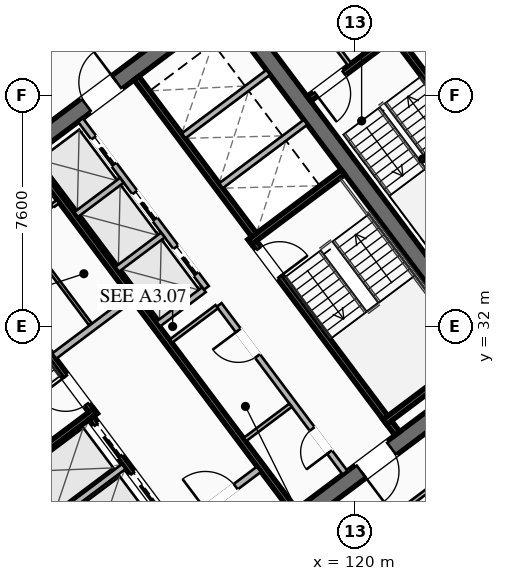
"""IFC4 building model, lengths in metres.
Left out: names, types, materials, properties, quantities, classifications, styles, units other than length and angle.
Written with IfcOpenShell. Run it as: python <this file> out.ifc"""

import sys

from ifc_helpers import new_model, si_unit, direction, frame, frame_2d, origin, place, context, subcontext, project, spatial, rectangle, extrude, element, fill, save


model = new_model("IFC4")
c1 = context("Model", 3, precision=1e-05, world=origin(), true_north=direction((0.0, 1.0)))
c2 = subcontext(c1, "Body", "Model", "MODEL_VIEW")
j1 = project(units=[si_unit("LENGTHUNIT", "METRE"), si_unit("PLANEANGLEUNIT", "RADIAN")], contexts=[c1])
p1 = place(None, origin())
s1 = spatial("IfcSite", under=j1, at=p1, CompositionType="ELEMENT")
p2 = place(p1, origin())
s2 = spatial("IfcBuilding", under=s1, at=p2, CompositionType="ELEMENT")
p3 = place(p2, frame((0.0, 0.0, 153.45)))
s3 = spatial("IfcBuildingStorey", under=s2, at=p3, CompositionType="ELEMENT", Elevation=153.45)
for number, where, z_axis, x_axis in (
    (1, (112.436, 21.077, 0.0), (0.0, 0.0, 1.0), (-0.6, 0.8, 0.0)),
    (2, (115.564, 42.923, 0.0), (0.0, 0.0, 1.0), (0.6, -0.8, 0.0)),
):
    element("IfcWall", number, at=place(p3, frame(where, z_axis=z_axis, x_axis=x_axis)), inside=s3, PredefinedType="SHEAR", context=c2, shape_type="SweptSolid", body=[
        extrude(rectangle(XDim=15.6, YDim=0.55, at=frame_2d((7.8, 0.0))), origin(), (0.0, 0.0, 1.0), 3.55),
    ])
p4 = place(p3, frame((124.539, 30.498, 0.0), z_axis=(0.0, 0.0, 1.0), x_axis=(-0.799998054672, -0.600002593761, 0.0)))
e3 = element("IfcWall", 3, at=p4, inside=s3, PredefinedType="SHEAR", context=c2, shape_type="SweptSolid", body=[
    extrude(rectangle(XDim=15.06, YDim=0.55, at=frame_2d((7.53, 0.0))), origin(), (0.0, 0.0, 1.0), 3.55),
])
p5 = place(p4, frame((9.23, 0.0, 0.0)))
e4 = element("IfcOpeningElement", 4, at=p5, cuts=e3, PredefinedType="OPENING", context=c2, shape_type="SweptSolid", body=[
    extrude(rectangle(XDim=1.25, YDim=2.25, at=frame_2d((0.625, 1.125))), frame((0.0, 0.285, 0.0), z_axis=(0.0, -1.0, 0.0), x_axis=(1.0, 0.0, 0.0)), (0.0, 0.0, 1.0), 0.57),
])
p6 = place(p4, frame((4.18, 0.0, 0.0)))
e5 = element("IfcOpeningElement", 5, at=p6, cuts=e3, PredefinedType="OPENING", context=c2, shape_type="SweptSolid", body=[
    extrude(rectangle(XDim=1.25, YDim=2.25, at=frame_2d((0.625, 1.125))), frame((0.0, 0.285, 0.0), z_axis=(0.0, -1.0, 0.0), x_axis=(1.0, 0.0, 0.0)), (0.0, 0.0, 1.0), 0.57),
])
p7 = place(p3, frame((103.461, 33.502, 0.0), z_axis=(0.0, 0.0, 1.0), x_axis=(0.799998054672, 0.600002593761, 0.0)))
e6 = element("IfcWall", 6, at=p7, inside=s3, PredefinedType="SHEAR", context=c2, shape_type="SweptSolid", body=[
    extrude(rectangle(XDim=15.06, YDim=0.55, at=frame_2d((7.53, 0.0))), origin(), (0.0, 0.0, 1.0), 3.55),
])
p8 = place(p7, frame((4.58, 0.0, 0.0)))
e7 = element("IfcOpeningElement", 7, at=p8, cuts=e6, PredefinedType="OPENING", context=c2, shape_type="SweptSolid", body=[
    extrude(rectangle(XDim=1.25, YDim=2.25, at=frame_2d((0.625, 1.125))), frame((0.0, 0.285, 0.0), z_axis=(0.0, -1.0, 0.0), x_axis=(1.0, 0.0, 0.0)), (0.0, 0.0, 1.0), 0.57),
])
p9 = place(p7, frame((9.63, 0.0, 0.0)))
e8 = element("IfcOpeningElement", 8, at=p9, cuts=e6, PredefinedType="OPENING", context=c2, shape_type="SweptSolid", body=[
    extrude(rectangle(XDim=1.25, YDim=2.25, at=frame_2d((0.625, 1.125))), frame((0.0, 0.285, 0.0), z_axis=(0.0, -1.0, 0.0), x_axis=(1.0, 0.0, 0.0)), (0.0, 0.0, 1.0), 0.57),
])
p10 = place(p3, frame((111.44, 29.08, 0.0), z_axis=(0.0, 0.0, 1.0), x_axis=(-0.59999029481, 0.8000072788, 0.0)))
e9 = element("IfcWall", 9, at=p10, inside=s3, PredefinedType="SHEAR", context=c2, shape_type="SweptSolid", body=[
    extrude(rectangle(XDim=8.05, YDim=0.2, at=frame_2d((4.025, 0.0))), origin(), (0.0, 0.0, 1.0), 3.37),
])
p11 = place(p10, frame((0.45, 0.0, 0.0)))
e10 = element("IfcOpeningElement", 10, at=p11, cuts=e9, PredefinedType="OPENING", context=c2, shape_type="SweptSolid", body=[
    extrude(rectangle(XDim=1.15, YDim=2.2, at=frame_2d((0.575, 1.1))), frame((0.0, 0.11, 0.0), z_axis=(0.0, -1.0, 0.0), x_axis=(1.0, 0.0, 0.0)), (0.0, 0.0, 1.0), 0.22),
])
p12 = place(p3, frame((108.396, 26.922, 0.0), z_axis=(0.0, 0.0, 1.0), x_axis=(0.800015298837, 0.599979601008, 0.0)))
e11 = element("IfcWall", 11, at=p12, inside=s3, PredefinedType="SHEAR", context=c2, shape_type="SweptSolid", body=[
    extrude(rectangle(XDim=3.83, YDim=0.2, at=frame_2d((1.915, 0.0))), origin(), (0.0, 0.0, 1.0), 3.37),
])
p13 = place(p3, frame((116.56, 34.92, 0.0), z_axis=(0.0, 0.0, 1.0), x_axis=(0.59999029481, -0.8000072788, 0.0)))
e12 = element("IfcWall", 12, at=p13, inside=s3, PredefinedType="SHEAR", context=c2, shape_type="SweptSolid", body=[
    extrude(rectangle(XDim=8.05, YDim=0.2, at=frame_2d((4.025, 0.0))), origin(), (0.0, 0.0, 1.0), 3.37),
])
p14 = place(p13, frame((0.45, 0.0, 0.0)))
e13 = element("IfcOpeningElement", 13, at=p14, cuts=e12, PredefinedType="OPENING", context=c2, shape_type="SweptSolid", body=[
    extrude(rectangle(XDim=1.15, YDim=2.2, at=frame_2d((0.575, 1.1))), frame((0.0, 0.11, 0.0), z_axis=(0.0, -1.0, 0.0), x_axis=(1.0, 0.0, 0.0)), (0.0, 0.0, 1.0), 0.22),
])
for number, where, z_axis, x_axis in (
    (14, (116.54, 34.78, 0.0), (0.0, 0.0, 1.0), (0.8, 0.6, 0.0)),
    (15, (120.98, 28.86, 0.0), (0.0, 0.0, 1.0), (0.8, 0.6, 0.0)),
):
    element("IfcWall", number, at=place(p3, frame(where, z_axis=z_axis, x_axis=x_axis)), inside=s3, PredefinedType="SHEAR", context=c2, shape_type="SweptSolid", body=[
        extrude(rectangle(XDim=3.83, YDim=0.2, at=frame_2d((1.915, 0.0))), origin(), (0.0, 0.0, 1.0), 3.37),
    ])
p15 = place(p3, frame((117.998, 25.936, 0.0), z_axis=(0.0, 0.0, 1.0), x_axis=(-0.600002693989, 0.799997979501, 0.0)))
e16 = element("IfcWall", 16, at=p15, inside=s3, PredefinedType="SHEAR", context=c2, shape_type="SweptSolid", body=[
    extrude(rectangle(XDim=14.5, YDim=0.2, at=frame_2d((7.25, 0.0))), origin(), (0.0, 0.0, 1.0), 3.37),
])
p16 = place(p3, frame((110.104, 31.028, 0.0), z_axis=(0.0, 0.0, 1.0), x_axis=(0.800018601094, 0.59997519774, 0.0)))
e17 = element("IfcWall", 17, at=p16, inside=s3, PredefinedType="SOLIDWALL", context=c2, shape_type="SweptSolid", body=[
    extrude(rectangle(XDim=3.15, YDim=0.22, at=frame_2d((1.575, 0.0))), origin(), (0.0, 0.0, 1.0), 2.513),
])
p17 = place(p3, frame((114.316, 25.412, 0.0), z_axis=(0.0, 0.0, 1.0), x_axis=(0.800018601094, 0.59997519774, 0.0)))
e18 = element("IfcWall", 18, at=p17, inside=s3, PredefinedType="SOLIDWALL", context=c2, shape_type="SweptSolid", body=[
    extrude(rectangle(XDim=3.15, YDim=0.22, at=frame_2d((1.575, 0.0))), origin(), (0.0, 0.0, 1.0), 2.513),
])
p18 = place(p17, frame((0.95, 0.0, 0.0)))
e19 = element("IfcOpeningElement", 19, at=p18, cuts=e18, PredefinedType="OPENING", context=c2, shape_type="SweptSolid", body=[
    extrude(rectangle(XDim=1.25, YDim=2.25, at=frame_2d((0.625, 1.125))), frame((0.0, 0.12, 0.0), z_axis=(0.0, -1.0, 0.0), x_axis=(1.0, 0.0, 0.0)), (0.0, 0.0, 1.0), 0.24),
])
p19 = place(p3, frame((115.19, 23.83, 0.0), z_axis=(0.0, 0.0, 1.0), x_axis=(-0.599993943644, 0.800004542231, 0.0)))
e20 = element("IfcWall", 20, at=p19, inside=s3, PredefinedType="SHEAR", context=c2, shape_type="SweptSolid", body=[
    extrude(rectangle(XDim=6.45, YDim=0.2, at=frame_2d((3.225, 0.0))), origin(), (0.0, 0.0, 1.0), 3.37),
])
p20 = place(p19, frame((4.875, 0.0, 0.0)))
e21 = element("IfcOpeningElement", 21, at=p20, cuts=e20, PredefinedType="OPENING", context=c2, shape_type="SweptSolid", body=[
    extrude(rectangle(XDim=1.3, YDim=2.25, at=frame_2d((0.65, 1.125))), frame((0.0, 0.11, 0.0), z_axis=(0.0, -1.0, 0.0), x_axis=(1.0, 0.0, 0.0)), (0.0, 0.0, 1.0), 0.22),
])
p21 = place(p19, frame((2.875, 0.0, 0.0)))
e22 = element("IfcOpeningElement", 22, at=p21, cuts=e20, PredefinedType="OPENING", context=c2, shape_type="SweptSolid", body=[
    extrude(rectangle(XDim=1.3, YDim=2.25, at=frame_2d((0.65, 1.125))), frame((0.0, 0.11, 0.0), z_axis=(0.0, -1.0, 0.0), x_axis=(1.0, 0.0, 0.0)), (0.0, 0.0, 1.0), 0.22),
])
p22 = place(p19, frame((0.675, 0.0, 0.0)))
e23 = element("IfcOpeningElement", 23, at=p22, cuts=e20, PredefinedType="OPENING", context=c2, shape_type="SweptSolid", body=[
    extrude(rectangle(XDim=1.3, YDim=2.25, at=frame_2d((0.65, 1.125))), frame((0.0, 0.11, 0.0), z_axis=(0.0, -1.0, 0.0), x_axis=(1.0, 0.0, 0.0)), (0.0, 0.0, 1.0), 0.22),
])
p23 = place(p3, frame((109.608, 25.306, 0.0), z_axis=(0.0, 0.0, 1.0), x_axis=(0.8, 0.6, 0.0)))
e24 = element("IfcWall", 24, at=p23, inside=s3, PredefinedType="SOLIDWALL", context=c2, shape_type="SweptSolid", body=[
    extrude(rectangle(XDim=3.48, YDim=0.2, at=frame_2d((1.74, 0.0))), origin(), (0.0, 0.0, 1.0), 3.37),
])
p24 = place(p3, frame((112.81, 40.17, 0.0), z_axis=(0.0, 0.0, 1.0), x_axis=(0.599993943644, -0.800004542231, 0.0)))
e25 = element("IfcWall", 25, at=p24, inside=s3, PredefinedType="SHEAR", context=c2, shape_type="SweptSolid", body=[
    extrude(rectangle(XDim=6.45, YDim=0.2, at=frame_2d((3.225, 0.0))), origin(), (0.0, 0.0, 1.0), 3.37),
])
for number, where, z_axis, x_axis in (
    (26, (115.59, 36.63, 0.0), (0.0, 0.0, 1.0), (0.8, 0.6, 0.0)),
    (27, (114.36, 38.27, 0.0), (0.0, 0.0, 1.0), (0.8, 0.6, 0.0)),
):
    element("IfcWall", number, at=place(p3, frame(where, z_axis=z_axis, x_axis=x_axis)), inside=s3, PredefinedType="SOLIDWALL", context=c2, shape_type="SweptSolid", body=[
        extrude(rectangle(XDim=3.48, YDim=0.2, at=frame_2d((1.74, 0.0))), origin(), (0.0, 0.0, 1.0), 3.37),
    ])
p25 = place(p3, frame((107.71, 34.22, 0.0), z_axis=(0.0, 0.0, 1.0), x_axis=(0.799981399002, 0.60002480053, 0.0)))
e28 = element("IfcWall", 28, at=p25, inside=s3, PredefinedType="PARTITIONING", context=c2, shape_type="SweptSolid", body=[
    extrude(rectangle(XDim=3.15, YDim=0.135, at=frame_2d((1.575, 0.0))), origin(), (0.0, 0.0, 1.0), 2.513),
])
p26 = place(p25, frame((0.25, 0.0, 0.0)))
e29 = element("IfcOpeningElement", 29, at=p26, cuts=e28, PredefinedType="OPENING", context=c2, shape_type="SweptSolid", body=[
    extrude(rectangle(XDim=0.95, YDim=2.05, at=frame_2d((0.475, 1.025))), frame((0.0, 0.077, 0.0), z_axis=(0.0, -1.0, 0.0), x_axis=(1.0, 0.0, 0.0)), (0.0, 0.0, 1.0), 0.155),
])
p27 = place(p25, frame((1.95, 0.0, 0.0)))
e30 = element("IfcOpeningElement", 30, at=p27, cuts=e28, PredefinedType="OPENING", context=c2, shape_type="SweptSolid", body=[
    extrude(rectangle(XDim=0.95, YDim=2.05, at=frame_2d((0.475, 1.025))), frame((0.0, 0.077, 0.0), z_axis=(0.0, -1.0, 0.0), x_axis=(1.0, 0.0, 0.0)), (0.0, 0.0, 1.0), 0.155),
])
p28 = place(p3, frame((111.296, 32.072, 0.0), z_axis=(0.0, 0.0, 1.0), x_axis=(-0.59995887973, 0.800030838552, 0.0)))
e31 = element("IfcWall", 31, at=p28, inside=s3, PredefinedType="PARTITIONING", context=c2, shape_type="SweptSolid", body=[
    extrude(rectangle(XDim=3.8, YDim=0.11, at=frame_2d((1.9, 0.0))), origin(), (0.0, 0.0, 1.0), 2.513),
])
p29 = place(p3, frame((119.67, 27.19, 0.0), z_axis=(0.0, 0.0, 1.0), x_axis=(-0.599988677396, 0.800008491828, 0.0)))
e32 = element("IfcWall", 32, at=p29, inside=s3, PredefinedType="SOLIDWALL", context=c2, shape_type="SweptSolid", body=[
    extrude(rectangle(XDim=6.9, YDim=0.2, at=frame_2d((3.45, 0.0))), origin(), (0.0, 0.0, 1.0), 2.513),
])
p30 = place(p29, frame((0.85, 0.0, 0.0)))
e33 = element("IfcOpeningElement", 33, at=p30, cuts=e32, PredefinedType="OPENING", context=c2, shape_type="SweptSolid", body=[
    extrude(rectangle(XDim=0.95, YDim=2.05, at=frame_2d((0.475, 1.025))), frame((0.0, 0.11, 0.0), z_axis=(0.0, -1.0, 0.0), x_axis=(1.0, 0.0, 0.0)), (0.0, 0.0, 1.0), 0.22),
])
p31 = place(p29, frame((4.8, 0.0, 0.0)))
e34 = element("IfcOpeningElement", 34, at=p31, cuts=e32, PredefinedType="OPENING", context=c2, shape_type="SweptSolid", body=[
    extrude(rectangle(XDim=1.05, YDim=2.2, at=frame_2d((0.525, 1.1))), frame((0.0, 0.11, 0.0), z_axis=(0.0, -1.0, 0.0), x_axis=(1.0, 0.0, 0.0)), (0.0, 0.0, 1.0), 0.22),
])
for number, where, z_axis, x_axis in (
    (35, (113.946, 31.522, 0.0), (0.0, 0.0, 1.0), (0.8, 0.6, 0.0)),
    (36, (116.376, 28.282, 0.0), (0.0, 0.0, 1.0), (0.8, 0.6, 0.0)),
):
    element("IfcWall", number, at=place(p3, frame(where, z_axis=z_axis, x_axis=x_axis)), inside=s3, PredefinedType="PARTITIONING", context=c2, shape_type="SweptSolid", body=[
        extrude(rectangle(XDim=1.88, YDim=0.135, at=frame_2d((0.94, 0.0))), origin(), (0.0, 0.0, 1.0), 2.513),
    ])
p32 = place(p3, frame((115.11, 33.27, 0.0), z_axis=(0.0, 0.0, 1.0), x_axis=(-0.600011322243, 0.799991508192, 0.0)))
e37 = element("IfcWall", 37, at=p32, inside=s3, PredefinedType="SOLIDWALL", context=c2, shape_type="SweptSolid", body=[
    extrude(rectangle(XDim=6.9, YDim=0.2, at=frame_2d((3.45, 0.0))), origin(), (0.0, 0.0, 1.0), 3.37),
])
p33 = place(p32, frame((0.575, 0.0, 0.0)))
e38 = element("IfcOpeningElement", 38, at=p33, cuts=e37, PredefinedType="OPENING", context=c2, shape_type="SweptSolid", body=[
    extrude(rectangle(XDim=1.1, YDim=2.2, at=frame_2d((0.55, 1.1))), frame((0.0, 0.11, 0.0), z_axis=(0.0, -1.0, 0.0), x_axis=(1.0, 0.0, 0.0)), (0.0, 0.0, 1.0), 0.22),
])
p34 = place(p32, frame((2.825, 0.0, 0.0)))
e39 = element("IfcOpeningElement", 39, at=p34, cuts=e37, PredefinedType="OPENING", context=c2, shape_type="SweptSolid", body=[
    extrude(rectangle(XDim=1.1, YDim=2.2, at=frame_2d((0.55, 1.1))), frame((0.0, 0.11, 0.0), z_axis=(0.0, -1.0, 0.0), x_axis=(1.0, 0.0, 0.0)), (0.0, 0.0, 1.0), 0.22),
])
p35 = place(p32, frame((5.075, 0.0, 0.0)))
e40 = element("IfcOpeningElement", 40, at=p35, cuts=e37, PredefinedType="OPENING", context=c2, shape_type="SweptSolid", body=[
    extrude(rectangle(XDim=1.1, YDim=2.2, at=frame_2d((0.55, 1.1))), frame((0.0, 0.11, 0.0), z_axis=(0.0, -1.0, 0.0), x_axis=(1.0, 0.0, 0.0)), (0.0, 0.0, 1.0), 0.22),
])
p36 = place(p3, frame((113.526, 32.082, 0.0), z_axis=(0.0, 0.0, 1.0), x_axis=(0.800046745961, 0.599937666993, 0.0)))
e41 = element("IfcWall", 41, at=p36, inside=s3, PredefinedType="SOLIDWALL", context=c2, shape_type="SweptSolid", body=[
    extrude(rectangle(XDim=1.88, YDim=0.2, at=frame_2d((0.94, 0.0))), origin(), (0.0, 0.0, 1.0), 3.37),
])
p37 = place(p3, frame((112.176, 33.882, 0.0), z_axis=(0.0, 0.0, 1.0), x_axis=(0.8, 0.6, 0.0)))
e42 = element("IfcWall", 42, at=p37, inside=s3, PredefinedType="SOLIDWALL", context=c2, shape_type="SweptSolid", body=[
    extrude(rectangle(XDim=1.88, YDim=0.2, at=frame_2d((0.94, 0.0))), origin(), (0.0, 0.0, 1.0), 3.37),
])
p38 = place(p3, frame((110.826, 35.682, 0.0), z_axis=(0.0, 0.0, 1.0), x_axis=(0.799984418148, 0.600020775241, 0.0)))
e43 = element("IfcWall", 43, at=p38, inside=s3, PredefinedType="SOLIDWALL", context=c2, shape_type="SweptSolid", body=[
    extrude(rectangle(XDim=1.88, YDim=0.2, at=frame_2d((0.94, 0.0))), origin(), (0.0, 0.0, 1.0), 3.37),
])
p39 = place(p3, frame((125.304, 36.228, 0.0), z_axis=(0.0, 0.0, 1.0), x_axis=(-0.59998851072, 0.800008616831, 0.0)))
e44 = element("IfcWall", 44, at=p39, inside=s3, PredefinedType="SHEAR", context=c2, shape_type="SweptSolid", body=[
    extrude(rectangle(XDim=6.8, YDim=0.2, at=frame_2d((3.4, 0.0))), origin(), (0.0, 0.0, 1.0), 3.37),
])
p40 = place(p3, frame((121.204, 41.528, 0.0), z_axis=(0.0, 0.0, 1.0), x_axis=(-0.800017232136, -0.599977023131, 0.0)))
e45 = element("IfcWall", 45, at=p40, inside=s3, PredefinedType="SHEAR", context=c2, shape_type="SweptSolid", body=[
    extrude(rectangle(XDim=3.4, YDim=0.2, at=frame_2d((1.7, 0.0))), origin(), (0.0, 0.0, 1.0), 3.37),
])
p41 = place(p40, frame((1.975, 0.0, 0.0)))
e46 = element("IfcOpeningElement", 46, at=p41, cuts=e45, PredefinedType="OPENING", context=c2, shape_type="SweptSolid", body=[
    extrude(rectangle(XDim=1.15, YDim=2.2, at=frame_2d((0.575, 1.1))), frame((0.0, 0.11, 0.0), z_axis=(0.0, -1.0, 0.0), x_axis=(1.0, 0.0, 0.0)), (0.0, 0.0, 1.0), 0.22),
])
p42 = place(p3, frame((119.824, 40.618, 0.0), z_axis=(0.0, 0.0, 1.0), x_axis=(-0.599982243973, 0.800013316712, 0.0)))
e47 = element("IfcWall", 47, at=p42, inside=s3, PredefinedType="PARTITIONING", context=c2, shape_type="SweptSolid", body=[
    extrude(rectangle(XDim=4.4, YDim=0.135, at=frame_2d((2.2, 0.0))), origin(), (0.0, 0.0, 1.0), 2.513),
])
p43 = place(p3, frame((94.568, 31.826, 0.0), z_axis=(0.0, 0.0, 1.0), x_axis=(0.799997191971, 0.600003744021, 0.0)))
e48 = element("IfcWall", 48, at=p43, inside=s3, PredefinedType="PARTITIONING", context=c2, shape_type="SweptSolid", body=[
    extrude(rectangle(XDim=31.3, YDim=0.135, at=frame_2d((15.65, 0.0))), origin(), (0.0, 0.0, 1.0), 2.513),
])
p44 = place(p43, frame((0.3, 0.0, 0.0)))
e49 = element("IfcOpeningElement", 49, at=p44, cuts=e48, PredefinedType="OPENING", context=c2, shape_type="SweptSolid", body=[
    extrude(rectangle(XDim=0.95, YDim=2.05, at=frame_2d((0.475, 1.025))), frame((0.0, 0.077, 0.0), z_axis=(0.0, -1.0, 0.0), x_axis=(1.0, 0.0, 0.0)), (0.0, 0.0, 1.0), 0.155),
])
p45 = place(p3, frame((132.13, 33.91, 0.0), z_axis=(0.0, 0.0, 1.0), x_axis=(-0.799997191971, -0.600003744021, 0.0)))
e50 = element("IfcWall", 50, at=p45, inside=s3, PredefinedType="PARTITIONING", context=c2, shape_type="SweptSolid", body=[
    extrude(rectangle(XDim=31.3, YDim=0.135, at=frame_2d((15.65, 0.0))), origin(), (0.0, 0.0, 1.0), 2.513),
])
p46 = place(p45, frame((29.97, 0.0, 0.0)))
e51 = element("IfcOpeningElement", 51, at=p46, cuts=e50, PredefinedType="OPENING", context=c2, shape_type="SweptSolid", body=[
    extrude(rectangle(XDim=0.95, YDim=2.05, at=frame_2d((0.475, 1.025))), frame((0.0, 0.077, 0.0), z_axis=(0.0, -1.0, 0.0), x_axis=(1.0, 0.0, 0.0)), (0.0, 0.0, 1.0), 0.155),
])
p47 = place(p45, frame((0.38, 0.0, 0.0)))
e52 = element("IfcOpeningElement", 52, at=p47, cuts=e50, PredefinedType="OPENING", context=c2, shape_type="SweptSolid", body=[
    extrude(rectangle(XDim=0.95, YDim=2.05, at=frame_2d((0.475, 1.025))), frame((0.0, 0.077, 0.0), z_axis=(0.0, -1.0, 0.0), x_axis=(1.0, 0.0, 0.0)), (0.0, 0.0, 1.0), 0.155),
])
p48 = place(p3, frame((112.104, 20.928, 0.0), z_axis=(0.0, 0.0, 1.0), x_axis=(-0.599994940075, 0.800003794918, 0.0)))
e53 = element("IfcWall", 53, at=p48, inside=s3, PredefinedType="PARTITIONING", context=c2, shape_type="SweptSolid", body=[
    extrude(rectangle(XDim=15.44, YDim=0.135, at=frame_2d((7.72, 0.0))), origin(), (0.0, 0.0, 1.0), 2.513),
])
p49 = place(p9, origin())
e54 = element("IfcDoor", 54, at=p49, inside=s3, OperationType="SINGLE_SWING_RIGHT", PredefinedType="DOOR", context=c2, shape_type="SweptSolid", body=[
    extrude(rectangle(XDim=1.25, YDim=2.25, at=frame_2d((0.625, 1.125))), frame((0.0, 0.025, 0.0), z_axis=(0.0, -1.0, 0.0), x_axis=(1.0, 0.0, 0.0)), (0.0, 0.0, 1.0), 0.05),
])
fill(e8, e54)
p50 = place(p6, origin())
e55 = element("IfcDoor", 55, at=p50, inside=s3, OperationType="SINGLE_SWING_RIGHT", PredefinedType="DOOR", context=c2, shape_type="SweptSolid", body=[
    extrude(rectangle(XDim=1.25, YDim=2.25, at=frame_2d((0.625, 1.125))), frame((0.0, 0.025, 0.0), z_axis=(0.0, -1.0, 0.0), x_axis=(1.0, 0.0, 0.0)), (0.0, 0.0, 1.0), 0.05),
])
fill(e5, e55)
p51 = place(p11, origin())
e56 = element("IfcDoor", 56, at=p51, inside=s3, OperationType="SINGLE_SWING_RIGHT", PredefinedType="DOOR", context=c2, shape_type="SweptSolid", body=[
    extrude(rectangle(XDim=1.15, YDim=2.2, at=frame_2d((0.575, 1.1))), frame((0.0, 0.025, 0.0), z_axis=(0.0, -1.0, 0.0), x_axis=(1.0, 0.0, 0.0)), (0.0, 0.0, 1.0), 0.05),
])
fill(e10, e56)
p52 = place(p14, origin())
e57 = element("IfcDoor", 57, at=p52, inside=s3, OperationType="SINGLE_SWING_RIGHT", PredefinedType="DOOR", context=c2, shape_type="SweptSolid", body=[
    extrude(rectangle(XDim=1.15, YDim=2.2, at=frame_2d((0.575, 1.1))), frame((0.0, 0.025, 0.0), z_axis=(0.0, -1.0, 0.0), x_axis=(1.0, 0.0, 0.0)), (0.0, 0.0, 1.0), 0.05),
])
fill(e13, e57)
p53 = place(p18, origin())
e58 = element("IfcDoor", 58, at=p53, inside=s3, OperationType="SINGLE_SWING_LEFT", PredefinedType="DOOR", context=c2, shape_type="SweptSolid", body=[
    extrude(rectangle(XDim=1.25, YDim=2.25, at=frame_2d((0.625, 1.125))), frame((0.0, 0.025, 0.0), z_axis=(0.0, -1.0, 0.0), x_axis=(1.0, 0.0, 0.0)), (0.0, 0.0, 1.0), 0.05),
])
fill(e19, e58)
p54 = place(p30, origin())
e59 = element("IfcDoor", 59, at=p54, inside=s3, OperationType="SINGLE_SWING_LEFT", PredefinedType="DOOR", context=c2, shape_type="SweptSolid", body=[
    extrude(rectangle(XDim=0.95, YDim=2.05, at=frame_2d((0.475, 1.025))), frame((0.0, 0.025, 0.0), z_axis=(0.0, -1.0, 0.0), x_axis=(1.0, 0.0, 0.0)), (0.0, 0.0, 1.0), 0.05),
])
fill(e33, e59)
p55 = place(p31, origin())
e60 = element("IfcDoor", 60, at=p55, inside=s3, OperationType="SINGLE_SWING_RIGHT", PredefinedType="DOOR", context=c2, shape_type="SweptSolid", body=[
    extrude(rectangle(XDim=1.05, YDim=2.2, at=frame_2d((0.525, 1.1))), frame((0.0, 0.025, 0.0), z_axis=(0.0, -1.0, 0.0), x_axis=(1.0, 0.0, 0.0)), (0.0, 0.0, 1.0), 0.05),
])
fill(e34, e60)
p56 = place(p41, origin())
e61 = element("IfcDoor", 61, at=p56, inside=s3, OperationType="SINGLE_SWING_RIGHT", PredefinedType="DOOR", context=c2, shape_type="SweptSolid", body=[
    extrude(rectangle(XDim=1.15, YDim=2.2, at=frame_2d((0.575, 1.1))), frame((0.0, 0.025, 0.0), z_axis=(0.0, -1.0, 0.0), x_axis=(1.0, 0.0, 0.0)), (0.0, 0.0, 1.0), 0.05),
])
fill(e46, e61)
p57 = place(p20, origin())
e62 = element("IfcDoor", 62, at=p57, inside=s3, OperationType="SLIDING_TO_LEFT", PredefinedType="DOOR", context=c2, shape_type="SweptSolid", body=[
    extrude(rectangle(XDim=1.3, YDim=2.25, at=frame_2d((0.65, 1.125))), frame((0.0, 0.025, 0.0), z_axis=(0.0, -1.0, 0.0), x_axis=(1.0, 0.0, 0.0)), (0.0, 0.0, 1.0), 0.05),
])
fill(e21, e62)
p58 = place(p21, origin())
e63 = element("IfcDoor", 63, at=p58, inside=s3, OperationType="SLIDING_TO_LEFT", PredefinedType="DOOR", context=c2, shape_type="SweptSolid", body=[
    extrude(rectangle(XDim=1.3, YDim=2.25, at=frame_2d((0.65, 1.125))), frame((0.0, 0.025, 0.0), z_axis=(0.0, -1.0, 0.0), x_axis=(1.0, 0.0, 0.0)), (0.0, 0.0, 1.0), 0.05),
])
fill(e22, e63)
p59 = place(p33, origin())
e64 = element("IfcDoor", 64, at=p59, inside=s3, OperationType="SLIDING_TO_LEFT", PredefinedType="DOOR", context=c2, shape_type="SweptSolid", body=[
    extrude(rectangle(XDim=1.1, YDim=2.2, at=frame_2d((0.55, 1.1))), frame((0.0, 0.025, 0.0), z_axis=(0.0, -1.0, 0.0), x_axis=(1.0, 0.0, 0.0)), (0.0, 0.0, 1.0), 0.05),
])
fill(e38, e64)
p60 = place(p34, origin())
e65 = element("IfcDoor", 65, at=p60, inside=s3, OperationType="SLIDING_TO_LEFT", PredefinedType="DOOR", context=c2, shape_type="SweptSolid", body=[
    extrude(rectangle(XDim=1.1, YDim=2.2, at=frame_2d((0.55, 1.1))), frame((0.0, 0.025, 0.0), z_axis=(0.0, -1.0, 0.0), x_axis=(1.0, 0.0, 0.0)), (0.0, 0.0, 1.0), 0.05),
])
fill(e39, e65)
p61 = place(p35, origin())
e66 = element("IfcDoor", 66, at=p61, inside=s3, OperationType="SLIDING_TO_LEFT", PredefinedType="DOOR", context=c2, shape_type="SweptSolid", body=[
    extrude(rectangle(XDim=1.1, YDim=2.2, at=frame_2d((0.55, 1.1))), frame((0.0, 0.025, 0.0), z_axis=(0.0, -1.0, 0.0), x_axis=(1.0, 0.0, 0.0)), (0.0, 0.0, 1.0), 0.05),
])
fill(e40, e66)
save(model, sys.argv[1])
